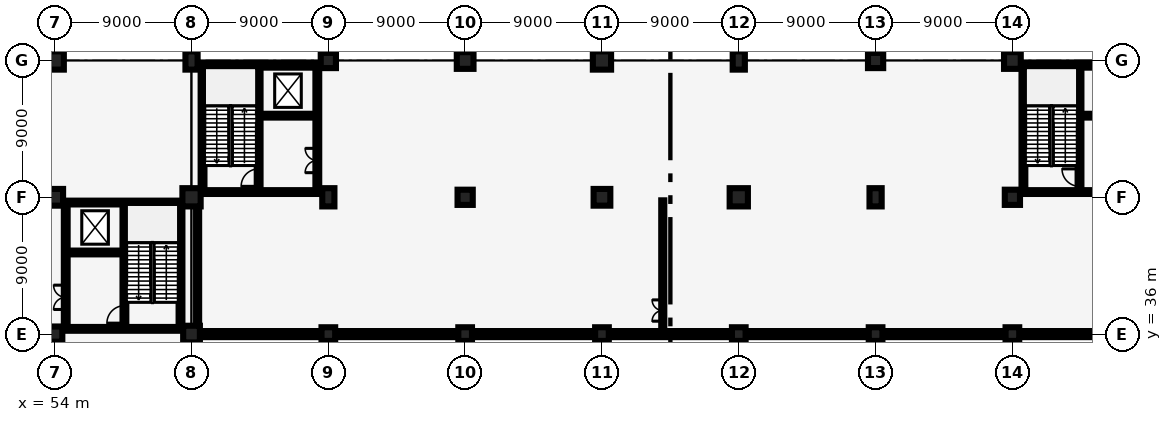
"""IFC4 building model, lengths in metres.
Left out: names, types, materials, properties, quantities, classifications, styles, units other than length and angle.
Written with IfcOpenShell. Run it as: python <this file> out.ifc"""

import sys

from ifc_helpers import new_model, si_unit, direction, frame, frame_2d, origin, origin_2d, place, context, subcontext, project, spatial, rectangle, extrude, element, fill, save


model = new_model("IFC4")
c1 = context("Model", 3, precision=1e-05, world=origin(), true_north=direction((0.0, 1.0)))
c2 = subcontext(c1, "Body", "Model", "MODEL_VIEW")
j1 = project(units=[si_unit("LENGTHUNIT", "METRE"), si_unit("PLANEANGLEUNIT", "RADIAN")], contexts=[c1])
p1 = place(None, origin())
s1 = spatial("IfcSite", under=j1, at=p1, CompositionType="ELEMENT")
p2 = place(p1, origin())
s2 = spatial("IfcBuilding", under=s1, at=p2, CompositionType="ELEMENT")
p3 = place(p2, frame((0.0, 0.0, -5.0)))
s3 = spatial("IfcBuildingStorey", under=s2, at=p3, CompositionType="ELEMENT", Elevation=-5.0)
p4 = place(p3, frame((54.0, 36.0, 0.0), z_axis=(0.0, 0.0, 1.0), x_axis=(1.0, 0.0, 0.0)))
e1 = element("IfcColumn", 1, at=p4, inside=s3, PredefinedType="COLUMN", context=c2, shape_type="SweptSolid", body=[
    extrude(rectangle(XDim=1.0, YDim=1.0, at=origin_2d()), origin(), (0.0, 0.0, 1.0), 5.0),
])
p5 = place(p3, frame((54.0, 45.0, 0.0), z_axis=(0.0, 0.0, 1.0), x_axis=(1.0, 0.0, 0.0)))
e2 = element("IfcColumn", 2, at=p5, inside=s3, PredefinedType="COLUMN", context=c2, shape_type="SweptSolid", body=[
    extrude(rectangle(XDim=1.1, YDim=1.1, at=origin_2d()), origin(), (0.0, 0.0, 1.0), 5.0),
])
p6 = place(p3, frame((54.0, 54.0, 0.0), z_axis=(0.0, 0.0, 1.0), x_axis=(1.0, 0.0, 0.0)))
e3 = element("IfcColumn", 3, at=p6, inside=s3, PredefinedType="COLUMN", context=c2, shape_type="SweptSolid", body=[
    extrude(rectangle(XDim=1.2, YDim=1.2, at=origin_2d()), origin(), (0.0, 0.0, 1.0), 5.0),
])
p7 = place(p3, frame((63.0, 36.0, 0.0), z_axis=(0.0, 0.0, 1.0), x_axis=(1.0, 0.0, 0.0)))
e4 = element("IfcColumn", 4, at=p7, inside=s3, PredefinedType="COLUMN", context=c2, shape_type="SweptSolid", body=[
    extrude(rectangle(XDim=1.1, YDim=1.1, at=origin_2d()), origin(), (0.0, 0.0, 1.0), 5.0),
])
p8 = place(p3, frame((63.0, 45.0, 0.0), z_axis=(0.0, 0.0, 1.0), x_axis=(1.0, 0.0, 0.0)))
e5 = element("IfcColumn", 5, at=p8, inside=s3, PredefinedType="COLUMN", context=c2, shape_type="SweptSolid", body=[
    extrude(rectangle(XDim=1.2, YDim=1.2, at=origin_2d()), origin(), (0.0, 0.0, 1.0), 5.0),
])
p9 = place(p3, frame((63.0, 54.0, 0.0), z_axis=(0.0, 0.0, 1.0), x_axis=(1.0, 0.0, 0.0)))
e6 = element("IfcColumn", 6, at=p9, inside=s3, PredefinedType="COLUMN", context=c2, shape_type="SweptSolid", body=[
    extrude(rectangle(XDim=0.8, YDim=1.2, at=origin_2d()), origin(), (0.0, 0.0, 1.0), 5.0),
])
p10 = place(p3, frame((72.0, 36.0, 0.0), z_axis=(0.0, 0.0, 1.0), x_axis=(1.0, 0.0, 0.0)))
e7 = element("IfcColumn", 7, at=p10, inside=s3, PredefinedType="COLUMN", context=c2, shape_type="SweptSolid", body=[
    extrude(rectangle(XDim=0.9, YDim=0.9, at=origin_2d()), origin(), (0.0, 0.0, 1.0), 5.0),
])
p11 = place(p3, frame((72.0, 45.0, 0.0), z_axis=(0.0, 0.0, 1.0), x_axis=(1.0, 0.0, 0.0)))
e8 = element("IfcColumn", 8, at=p11, inside=s3, PredefinedType="COLUMN", context=c2, shape_type="SweptSolid", body=[
    extrude(rectangle(XDim=0.8, YDim=1.2, at=origin_2d()), origin(), (0.0, 0.0, 1.0), 5.0),
])
p12 = place(p3, frame((72.0, 54.0, 0.0), z_axis=(0.0, 0.0, 1.0), x_axis=(1.0, 0.0, 0.0)))
e9 = element("IfcColumn", 9, at=p12, inside=s3, PredefinedType="COLUMN", context=c2, shape_type="SweptSolid", body=[
    extrude(rectangle(XDim=1.0, YDim=1.0, at=origin_2d()), origin(), (0.0, 0.0, 1.0), 5.0),
])
p13 = place(p3, frame((81.0, 36.0, 0.0), z_axis=(0.0, 0.0, 1.0), x_axis=(1.0, 0.0, 0.0)))
e10 = element("IfcColumn", 10, at=p13, inside=s3, PredefinedType="COLUMN", context=c2, shape_type="SweptSolid", body=[
    extrude(rectangle(XDim=0.9, YDim=0.9, at=origin_2d()), origin(), (0.0, 0.0, 1.0), 5.0),
])
p14 = place(p3, frame((81.0, 45.0, 0.0), z_axis=(0.0, 0.0, 1.0), x_axis=(1.0, 0.0, 0.0)))
e11 = element("IfcColumn", 11, at=p14, inside=s3, PredefinedType="COLUMN", context=c2, shape_type="SweptSolid", body=[
    extrude(rectangle(XDim=1.0, YDim=1.0, at=origin_2d()), origin(), (0.0, 0.0, 1.0), 5.0),
])
p15 = place(p3, frame((81.0, 54.0, 0.0), z_axis=(0.0, 0.0, 1.0), x_axis=(1.0, 0.0, 0.0)))
e12 = element("IfcColumn", 12, at=p15, inside=s3, PredefinedType="COLUMN", context=c2, shape_type="SweptSolid", body=[
    extrude(rectangle(XDim=1.1, YDim=1.1, at=origin_2d()), origin(), (0.0, 0.0, 1.0), 5.0),
])
p16 = place(p3, frame((90.0, 36.0, 0.0), z_axis=(0.0, 0.0, 1.0), x_axis=(1.0, 0.0, 0.0)))
e13 = element("IfcColumn", 13, at=p16, inside=s3, PredefinedType="COLUMN", context=c2, shape_type="SweptSolid", body=[
    extrude(rectangle(XDim=0.9, YDim=0.9, at=origin_2d()), origin(), (0.0, 0.0, 1.0), 5.0),
])
p17 = place(p3, frame((90.0, 45.0, 0.0), z_axis=(0.0, 0.0, 1.0), x_axis=(1.0, 0.0, 0.0)))
e14 = element("IfcColumn", 14, at=p17, inside=s3, PredefinedType="COLUMN", context=c2, shape_type="SweptSolid", body=[
    extrude(rectangle(XDim=1.1, YDim=1.1, at=origin_2d()), origin(), (0.0, 0.0, 1.0), 5.0),
])
p18 = place(p3, frame((90.0, 54.0, 0.0), z_axis=(0.0, 0.0, 1.0), x_axis=(1.0, 0.0, 0.0)))
e15 = element("IfcColumn", 15, at=p18, inside=s3, PredefinedType="COLUMN", context=c2, shape_type="SweptSolid", body=[
    extrude(rectangle(XDim=1.2, YDim=1.2, at=origin_2d()), origin(), (0.0, 0.0, 1.0), 5.0),
])
p19 = place(p3, frame((99.0, 36.0, 0.0), z_axis=(0.0, 0.0, 1.0), x_axis=(1.0, 0.0, 0.0)))
e16 = element("IfcColumn", 16, at=p19, inside=s3, PredefinedType="COLUMN", context=c2, shape_type="SweptSolid", body=[
    extrude(rectangle(XDim=0.9, YDim=0.9, at=origin_2d()), origin(), (0.0, 0.0, 1.0), 5.0),
])
p20 = place(p3, frame((99.0, 45.0, 0.0), z_axis=(0.0, 0.0, 1.0), x_axis=(1.0, 0.0, 0.0)))
e17 = element("IfcColumn", 17, at=p20, inside=s3, PredefinedType="COLUMN", context=c2, shape_type="SweptSolid", body=[
    extrude(rectangle(XDim=1.2, YDim=1.2, at=origin_2d()), origin(), (0.0, 0.0, 1.0), 5.0),
])
p21 = place(p3, frame((99.0, 54.0, 0.0), z_axis=(0.0, 0.0, 1.0), x_axis=(1.0, 0.0, 0.0)))
e18 = element("IfcColumn", 18, at=p21, inside=s3, PredefinedType="COLUMN", context=c2, shape_type="SweptSolid", body=[
    extrude(rectangle(XDim=0.8, YDim=1.2, at=origin_2d()), origin(), (0.0, 0.0, 1.0), 5.0),
])
p22 = place(p3, frame((108.0, 36.0, 0.0), z_axis=(0.0, 0.0, 1.0), x_axis=(1.0, 0.0, 0.0)))
e19 = element("IfcColumn", 19, at=p22, inside=s3, PredefinedType="COLUMN", context=c2, shape_type="SweptSolid", body=[
    extrude(rectangle(XDim=0.9, YDim=0.9, at=origin_2d()), origin(), (0.0, 0.0, 1.0), 5.0),
])
p23 = place(p3, frame((108.0, 45.0, 0.0), z_axis=(0.0, 0.0, 1.0), x_axis=(1.0, 0.0, 0.0)))
e20 = element("IfcColumn", 20, at=p23, inside=s3, PredefinedType="COLUMN", context=c2, shape_type="SweptSolid", body=[
    extrude(rectangle(XDim=0.8, YDim=1.2, at=origin_2d()), origin(), (0.0, 0.0, 1.0), 5.0),
])
p24 = place(p3, frame((108.0, 54.0, 0.0), z_axis=(0.0, 0.0, 1.0), x_axis=(1.0, 0.0, 0.0)))
e21 = element("IfcColumn", 21, at=p24, inside=s3, PredefinedType="COLUMN", context=c2, shape_type="SweptSolid", body=[
    extrude(rectangle(XDim=1.0, YDim=1.0, at=origin_2d()), origin(), (0.0, 0.0, 1.0), 5.0),
])
p25 = place(p3, frame((117.0, 36.0, 0.0), z_axis=(0.0, 0.0, 1.0), x_axis=(1.0, 0.0, 0.0)))
e22 = element("IfcColumn", 22, at=p25, inside=s3, PredefinedType="COLUMN", context=c2, shape_type="SweptSolid", body=[
    extrude(rectangle(XDim=0.9, YDim=0.9, at=origin_2d()), origin(), (0.0, 0.0, 1.0), 5.0),
])
p26 = place(p3, frame((117.0, 45.0, 0.0), z_axis=(0.0, 0.0, 1.0), x_axis=(1.0, 0.0, 0.0)))
e23 = element("IfcColumn", 23, at=p26, inside=s3, PredefinedType="COLUMN", context=c2, shape_type="SweptSolid", body=[
    extrude(rectangle(XDim=1.0, YDim=1.0, at=origin_2d()), origin(), (0.0, 0.0, 1.0), 5.0),
])
p27 = place(p3, frame((117.0, 54.0, 0.0), z_axis=(0.0, 0.0, 1.0), x_axis=(1.0, 0.0, 0.0)))
e24 = element("IfcColumn", 24, at=p27, inside=s3, PredefinedType="COLUMN", context=c2, shape_type="SweptSolid", body=[
    extrude(rectangle(XDim=1.1, YDim=1.1, at=origin_2d()), origin(), (0.0, 0.0, 1.0), 5.0),
])
p28 = place(p3, frame((63.545, 36.0, 0.0), z_axis=(0.0, 0.0, 1.0), x_axis=(1.0, 0.0, 0.0)))
e25 = element("IfcWall", 25, at=p28, inside=s3, PredefinedType="SHEAR", context=c2, shape_type="SweptSolid", body=[
    extrude(rectangle(XDim=61.96, YDim=0.4, at=frame_2d((30.98, 0.0))), origin(), (0.0, 0.0, 1.0), 3.95),
])
p29 = place(p3, frame((54.725, 36.47, 0.0), z_axis=(0.0, 0.0, 1.0), x_axis=(0.0, 1.0, 0.0)))
e26 = element("IfcWall", 26, at=p29, inside=s3, PredefinedType="SHEAR", context=c2, shape_type="SweptSolid", body=[
    extrude(rectangle(XDim=8.06, YDim=0.25, at=frame_2d((4.03, 0.0))), origin(), (0.0, 0.0, 1.0), 4.66),
])
p30 = place(p29, frame((1.15, 0.0, 0.0)))
e27 = element("IfcOpeningElement", 27, at=p30, cuts=e26, PredefinedType="OPENING", context=c2, shape_type="SweptSolid", body=[
    extrude(rectangle(XDim=1.6, YDim=2.2, at=frame_2d((0.8, 1.1))), frame((0.0, 0.135, 0.0), z_axis=(0.0, -1.0, 0.0), x_axis=(1.0, 0.0, 0.0)), (0.0, 0.0, 1.0), 0.27),
])
p31 = place(p3, frame((62.275, 36.47, 0.0), z_axis=(0.0, 0.0, 1.0), x_axis=(0.0, 1.0, 0.0)))
e28 = element("IfcWall", 28, at=p31, inside=s3, PredefinedType="SHEAR", context=c2, shape_type="SweptSolid", body=[
    extrude(rectangle(XDim=8.06, YDim=0.25, at=frame_2d((4.03, 0.0))), origin(), (0.0, 0.0, 1.0), 4.66),
])
for number, where, z_axis, x_axis in (
    (29, (54.6, 36.345, 0.0), (0.0, 0.0, 1.0), (1.0, 0.0, 0.0)),
    (30, (54.6, 44.655, 0.0), (0.0, 0.0, 1.0), (1.0, 0.0, 0.0)),
):
    element("IfcWall", number, at=place(p3, frame(where, z_axis=z_axis, x_axis=x_axis)), inside=s3, PredefinedType="SHEAR", context=c2, shape_type="SweptSolid", body=[
        extrude(rectangle(XDim=7.8, YDim=0.25, at=frame_2d((3.9, 0.0))), origin(), (0.0, 0.0, 1.0), 4.66),
    ])
p32 = place(p3, frame((58.585, 36.47, 0.0), z_axis=(0.0, 0.0, 1.0), x_axis=(0.0, 1.0, 0.0)))
e31 = element("IfcWall", 31, at=p32, inside=s3, PredefinedType="SHEAR", context=c2, shape_type="SweptSolid", body=[
    extrude(rectangle(XDim=8.06, YDim=0.25, at=frame_2d((4.03, 0.0))), origin(), (0.0, 0.0, 1.0), 4.66),
])
p33 = place(p32, frame((0.25, 0.0, 0.0)))
e32 = element("IfcOpeningElement", 32, at=p33, cuts=e31, PredefinedType="OPENING", context=c2, shape_type="SweptSolid", body=[
    extrude(rectangle(XDim=1.15, YDim=2.15, at=frame_2d((0.575, 1.075))), frame((0.0, 0.135, 0.0), z_axis=(0.0, -1.0, 0.0), x_axis=(1.0, 0.0, 0.0)), (0.0, 0.0, 1.0), 0.27),
])
p34 = place(p3, frame((54.85, 41.37, 0.0), z_axis=(0.0, 0.0, 1.0), x_axis=(1.0, 0.0, 0.0)))
e33 = element("IfcWall", 33, at=p34, inside=s3, PredefinedType="SHEAR", context=c2, shape_type="SweptSolid", body=[
    extrude(rectangle(XDim=3.61, YDim=0.25, at=frame_2d((1.805, 0.0))), origin(), (0.0, 0.0, 1.0), 4.66),
])
p35 = place(p34, frame((0.95, 0.0, 0.0)))
e34 = element("IfcOpeningElement", 34, at=p35, cuts=e33, PredefinedType="OPENING", context=c2, shape_type="SweptSolid", body=[
    extrude(rectangle(XDim=1.2, YDim=2.2, at=frame_2d((0.6, 1.1))), frame((0.0, 0.135, 0.0), z_axis=(0.0, -1.0, 0.0), x_axis=(1.0, 0.0, 0.0)), (0.0, 0.0, 1.0), 0.27),
])
p36 = place(p3, frame((63.725, 45.47, 0.0), z_axis=(0.0, 0.0, 1.0), x_axis=(0.0, 1.0, 0.0)))
e35 = element("IfcWall", 35, at=p36, inside=s3, PredefinedType="SHEAR", context=c2, shape_type="SweptSolid", body=[
    extrude(rectangle(XDim=8.06, YDim=0.25, at=frame_2d((4.03, 0.0))), origin(), (0.0, 0.0, 1.0), 4.68),
])
p37 = place(p3, frame((71.275, 45.47, 0.0), z_axis=(0.0, 0.0, 1.0), x_axis=(0.0, 1.0, 0.0)))
e36 = element("IfcWall", 36, at=p37, inside=s3, PredefinedType="SHEAR", context=c2, shape_type="SweptSolid", body=[
    extrude(rectangle(XDim=8.06, YDim=0.25, at=frame_2d((4.03, 0.0))), origin(), (0.0, 0.0, 1.0), 4.68),
])
p38 = place(p37, frame((1.15, 0.0, 0.0)))
e37 = element("IfcOpeningElement", 37, at=p38, cuts=e36, PredefinedType="OPENING", context=c2, shape_type="SweptSolid", body=[
    extrude(rectangle(XDim=1.6, YDim=2.2, at=frame_2d((0.8, 1.1))), frame((0.0, 0.135, 0.0), z_axis=(0.0, -1.0, 0.0), x_axis=(1.0, 0.0, 0.0)), (0.0, 0.0, 1.0), 0.27),
])
for number, where, z_axis, x_axis in (
    (38, (63.6, 45.345, 0.0), (0.0, 0.0, 1.0), (1.0, 0.0, 0.0)),
    (39, (63.6, 53.655, 0.0), (0.0, 0.0, 1.0), (1.0, 0.0, 0.0)),
):
    element("IfcWall", number, at=place(p3, frame(where, z_axis=z_axis, x_axis=x_axis)), inside=s3, PredefinedType="SHEAR", context=c2, shape_type="SweptSolid", body=[
        extrude(rectangle(XDim=7.8, YDim=0.25, at=frame_2d((3.9, 0.0))), origin(), (0.0, 0.0, 1.0), 4.68),
    ])
p39 = place(p3, frame((67.415, 45.47, 0.0), z_axis=(0.0, 0.0, 1.0), x_axis=(0.0, 1.0, 0.0)))
e40 = element("IfcWall", 40, at=p39, inside=s3, PredefinedType="SHEAR", context=c2, shape_type="SweptSolid", body=[
    extrude(rectangle(XDim=8.06, YDim=0.25, at=frame_2d((4.03, 0.0))), origin(), (0.0, 0.0, 1.0), 4.68),
])
p40 = place(p39, frame((0.25, 0.0, 0.0)))
e41 = element("IfcOpeningElement", 41, at=p40, cuts=e40, PredefinedType="OPENING", context=c2, shape_type="SweptSolid", body=[
    extrude(rectangle(XDim=1.15, YDim=2.15, at=frame_2d((0.575, 1.075))), frame((0.0, 0.135, 0.0), z_axis=(0.0, -1.0, 0.0), x_axis=(1.0, 0.0, 0.0)), (0.0, 0.0, 1.0), 0.27),
])
p41 = place(p3, frame((67.54, 50.37, 0.0), z_axis=(0.0, 0.0, 1.0), x_axis=(1.0, 0.0, 0.0)))
e42 = element("IfcWall", 42, at=p41, inside=s3, PredefinedType="SHEAR", context=c2, shape_type="SweptSolid", body=[
    extrude(rectangle(XDim=3.61, YDim=0.25, at=frame_2d((1.805, 0.0))), origin(), (0.0, 0.0, 1.0), 4.68),
])
p42 = place(p41, frame((0.95, 0.0, 0.0)))
e43 = element("IfcOpeningElement", 43, at=p42, cuts=e42, PredefinedType="OPENING", context=c2, shape_type="SweptSolid", body=[
    extrude(rectangle(XDim=1.2, YDim=2.2, at=frame_2d((0.6, 1.1))), frame((0.0, 0.135, 0.0), z_axis=(0.0, -1.0, 0.0), x_axis=(1.0, 0.0, 0.0)), (0.0, 0.0, 1.0), 0.27),
])
p43 = place(p3, frame((117.725, 45.47, 0.0), z_axis=(0.0, 0.0, 1.0), x_axis=(0.0, 1.0, 0.0)))
e44 = element("IfcWall", 44, at=p43, inside=s3, PredefinedType="SHEAR", context=c2, shape_type="SweptSolid", body=[
    extrude(rectangle(XDim=8.06, YDim=0.25, at=frame_2d((4.03, 0.0))), origin(), (0.0, 0.0, 1.0), 4.68),
])
for number, where, z_axis, x_axis in (
    (45, (117.6, 45.345, 0.0), (0.0, 0.0, 1.0), (1.0, 0.0, 0.0)),
    (46, (117.6, 53.655, 0.0), (0.0, 0.0, 1.0), (1.0, 0.0, 0.0)),
):
    element("IfcWall", number, at=place(p3, frame(where, z_axis=z_axis, x_axis=x_axis)), inside=s3, PredefinedType="SHEAR", context=c2, shape_type="SweptSolid", body=[
        extrude(rectangle(XDim=7.8, YDim=0.25, at=frame_2d((3.9, 0.0))), origin(), (0.0, 0.0, 1.0), 4.68),
    ])
p44 = place(p3, frame((121.415, 45.47, 0.0), z_axis=(0.0, 0.0, 1.0), x_axis=(0.0, 1.0, 0.0)))
e47 = element("IfcWall", 47, at=p44, inside=s3, PredefinedType="SHEAR", context=c2, shape_type="SweptSolid", body=[
    extrude(rectangle(XDim=8.06, YDim=0.25, at=frame_2d((4.03, 0.0))), origin(), (0.0, 0.0, 1.0), 4.68),
])
p45 = place(p44, frame((0.25, 0.0, 0.0)))
e48 = element("IfcOpeningElement", 48, at=p45, cuts=e47, PredefinedType="OPENING", context=c2, shape_type="SweptSolid", body=[
    extrude(rectangle(XDim=1.15, YDim=2.15, at=frame_2d((0.575, 1.075))), frame((0.0, 0.135, 0.0), z_axis=(0.0, -1.0, 0.0), x_axis=(1.0, 0.0, 0.0)), (0.0, 0.0, 1.0), 0.27),
])
p46 = place(p3, frame((121.54, 50.37, 0.0), z_axis=(0.0, 0.0, 1.0), x_axis=(1.0, 0.0, 0.0)))
e49 = element("IfcWall", 49, at=p46, inside=s3, PredefinedType="SHEAR", context=c2, shape_type="SweptSolid", body=[
    extrude(rectangle(XDim=3.61, YDim=0.25, at=frame_2d((1.805, 0.0))), origin(), (0.0, 0.0, 1.0), 4.68),
])
p47 = place(p46, frame((0.95, 0.0, 0.0)))
e50 = element("IfcOpeningElement", 50, at=p47, cuts=e49, PredefinedType="OPENING", context=c2, shape_type="SweptSolid", body=[
    extrude(rectangle(XDim=1.2, YDim=2.2, at=frame_2d((0.6, 1.1))), frame((0.0, 0.135, 0.0), z_axis=(0.0, -1.0, 0.0), x_axis=(1.0, 0.0, 0.0)), (0.0, 0.0, 1.0), 0.27),
])
p48 = place(p3, frame((94.0, 36.6, 0.0), z_axis=(0.0, 0.0, 1.0), x_axis=(0.0, 1.0, 0.0)))
e51 = element("IfcWall", 51, at=p48, inside=s3, PredefinedType="SOLIDWALL", context=c2, shape_type="SweptSolid", body=[
    extrude(rectangle(XDim=8.2, YDim=0.2, at=frame_2d((4.1, 0.0))), origin(), (0.0, 0.0, 1.0), 3.85),
])
p49 = place(p48, frame((0.25, 0.0, 0.0)))
e52 = element("IfcOpeningElement", 52, at=p49, cuts=e51, PredefinedType="OPENING", context=c2, shape_type="SweptSolid", body=[
    extrude(rectangle(XDim=1.4, YDim=2.25, at=frame_2d((0.7, 1.125))), frame((0.0, 0.11, 0.0), z_axis=(0.0, -1.0, 0.0), x_axis=(1.0, 0.0, 0.0)), (0.0, 0.0, 1.0), 0.22),
])
p50 = place(p3, frame((63.4, 36.72, 0.0), z_axis=(0.0, 0.0, 1.0), x_axis=(0.0, 1.0, 0.0)))
e53 = element("IfcWall", 53, at=p50, inside=s3, PredefinedType="SOLIDWALL", context=c2, shape_type="SweptSolid", body=[
    extrude(rectangle(XDim=7.96, YDim=0.2, at=frame_2d((3.98, 0.0))), origin(), (0.0, 0.0, 1.0), 3.85),
])
p51 = place(p33, origin())
e54 = element("IfcDoor", 54, at=p51, inside=s3, OperationType="SINGLE_SWING_LEFT", PredefinedType="DOOR", context=c2, shape_type="SweptSolid", body=[
    extrude(rectangle(XDim=1.15, YDim=2.15, at=frame_2d((0.575, 1.075))), frame((0.0, 0.025, 0.0), z_axis=(0.0, -1.0, 0.0), x_axis=(1.0, 0.0, 0.0)), (0.0, 0.0, 1.0), 0.05),
])
fill(e32, e54)
p52 = place(p35, origin())
e55 = element("IfcDoor", 55, at=p52, inside=s3, OperationType="DOUBLE_DOOR_SLIDING", PredefinedType="DOOR", context=c2, shape_type="SweptSolid", body=[
    extrude(rectangle(XDim=1.2, YDim=2.2, at=frame_2d((0.6, 1.1))), frame((0.0, 0.025, 0.0), z_axis=(0.0, -1.0, 0.0), x_axis=(1.0, 0.0, 0.0)), (0.0, 0.0, 1.0), 0.05),
])
fill(e34, e55)
p53 = place(p30, origin())
e56 = element("IfcDoor", 56, at=p53, inside=s3, OperationType="DOUBLE_DOOR_SINGLE_SWING", PredefinedType="DOOR", context=c2, shape_type="SweptSolid", body=[
    extrude(rectangle(XDim=1.6, YDim=2.2, at=frame_2d((0.8, 1.1))), frame((0.0, 0.025, 0.0), z_axis=(0.0, -1.0, 0.0), x_axis=(1.0, 0.0, 0.0)), (0.0, 0.0, 1.0), 0.05),
])
fill(e27, e56)
p54 = place(p40, origin())
e57 = element("IfcDoor", 57, at=p54, inside=s3, OperationType="SINGLE_SWING_LEFT", PredefinedType="DOOR", context=c2, shape_type="SweptSolid", body=[
    extrude(rectangle(XDim=1.15, YDim=2.15, at=frame_2d((0.575, 1.075))), frame((0.0, 0.025, 0.0), z_axis=(0.0, -1.0, 0.0), x_axis=(1.0, 0.0, 0.0)), (0.0, 0.0, 1.0), 0.05),
])
fill(e41, e57)
p55 = place(p42, origin())
e58 = element("IfcDoor", 58, at=p55, inside=s3, OperationType="DOUBLE_DOOR_SLIDING", PredefinedType="DOOR", context=c2, shape_type="SweptSolid", body=[
    extrude(rectangle(XDim=1.2, YDim=2.2, at=frame_2d((0.6, 1.1))), frame((0.0, 0.025, 0.0), z_axis=(0.0, -1.0, 0.0), x_axis=(1.0, 0.0, 0.0)), (0.0, 0.0, 1.0), 0.05),
])
fill(e43, e58)
p56 = place(p38, origin())
e59 = element("IfcDoor", 59, at=p56, inside=s3, OperationType="DOUBLE_DOOR_SINGLE_SWING", PredefinedType="DOOR", context=c2, shape_type="SweptSolid", body=[
    extrude(rectangle(XDim=1.6, YDim=2.2, at=frame_2d((0.8, 1.1))), frame((0.0, 0.025, 0.0), z_axis=(0.0, -1.0, 0.0), x_axis=(1.0, 0.0, 0.0)), (0.0, 0.0, 1.0), 0.05),
])
fill(e37, e59)
p57 = place(p45, origin())
e60 = element("IfcDoor", 60, at=p57, inside=s3, OperationType="SINGLE_SWING_RIGHT", PredefinedType="DOOR", context=c2, shape_type="SweptSolid", body=[
    extrude(rectangle(XDim=1.15, YDim=2.15, at=frame_2d((0.575, 1.075))), frame((0.0, 0.025, 0.0), z_axis=(0.0, -1.0, 0.0), x_axis=(1.0, 0.0, 0.0)), (0.0, 0.0, 1.0), 0.05),
])
fill(e48, e60)
p58 = place(p49, origin())
e61 = element("IfcDoor", 61, at=p58, inside=s3, OperationType="DOUBLE_DOOR_SINGLE_SWING", PredefinedType="DOOR", context=c2, shape_type="SweptSolid", body=[
    extrude(rectangle(XDim=1.4, YDim=2.25, at=frame_2d((0.7, 1.125))), frame((0.0, 0.025, 0.0), z_axis=(0.0, -1.0, 0.0), x_axis=(1.0, 0.0, 0.0)), (0.0, 0.0, 1.0), 0.05),
])
fill(e52, e61)
save(model, sys.argv[1])
